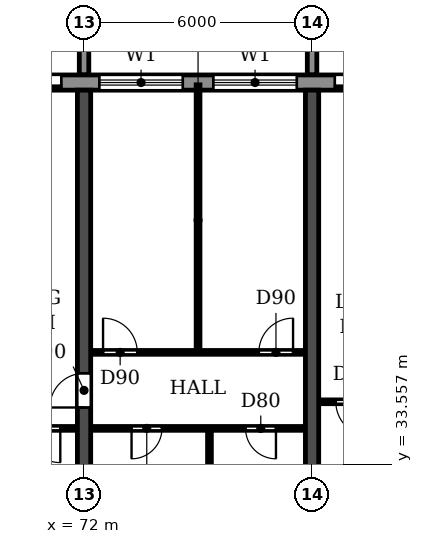
"""IFC4 building model, lengths in metres.
Left out: names, types, materials, properties, quantities, classifications, styles, units other than length and angle.
Written with IfcOpenShell. Run it as: python <this file> out.ifc"""

import sys

from ifc_helpers import new_model, si_unit, direction, frame, frame_2d, origin, place, context, subcontext, project, spatial, polyline, rectangle, outline, extrude, source, transform, mapped, element, fill, save


model = new_model("IFC4")
c1 = context("Model", 3, precision=1e-05, world=origin(), true_north=direction((0.0, 1.0)))
c2 = subcontext(c1, "Body", "Model", "MODEL_VIEW")
j1 = project(units=[si_unit("LENGTHUNIT", "METRE"), si_unit("PLANEANGLEUNIT", "RADIAN")], contexts=[c1])
p1 = place(None, origin())
s1 = spatial("IfcSite", under=j1, at=p1, CompositionType="ELEMENT")
p2 = place(p1, origin())
s2 = spatial("IfcBuilding", under=s1, at=p2, CompositionType="ELEMENT")
p3 = place(p2, frame((0.0, 0.0, 109.2)))
s3 = spatial("IfcBuildingStorey", under=s2, at=p3, CompositionType="ELEMENT", Elevation=109.2)
p4 = place(p3, frame((72.0, 30.525, 0.0), z_axis=(0.0, 0.0, 1.0), x_axis=(0.0, 1.0, 0.0)))
e1 = element("IfcWall", 1, at=p4, inside=s3, PredefinedType="SHEAR", context=c2, shape_type="SweptSolid", body=[
    extrude(rectangle(XDim=12.875, YDim=0.35, at=frame_2d((6.438, 0.0))), origin(), (0.0, 0.0, 1.0), 3.06),
])
p5 = place(p4, frame((4.525, 0.0, 0.0)))
e2 = element("IfcOpeningElement", 2, at=p5, cuts=e1, PredefinedType="OPENING", context=c2, shape_type="SweptSolid", body=[
    extrude(rectangle(XDim=0.9, YDim=2.1, at=frame_2d((0.45, 1.05))), frame((0.0, 0.185, 0.0), z_axis=(0.0, -1.0, 0.0), x_axis=(1.0, 0.0, 0.0)), (0.0, 0.0, 1.0), 0.37),
])
p6 = place(p3, frame((78.0, 30.525, 0.0), z_axis=(0.0, 0.0, 1.0), x_axis=(0.0, 1.0, 0.0)))
e3 = element("IfcWall", 3, at=p6, inside=s3, PredefinedType="SHEAR", context=c2, shape_type="SweptSolid", body=[
    extrude(rectangle(XDim=12.875, YDim=0.35, at=frame_2d((6.438, 0.0))), origin(), (0.0, 0.0, 1.0), 3.06),
])
p7 = place(p3, frame((85.317, 43.6, 0.0), z_axis=(0.0, 0.0, 1.0), x_axis=(-1.0, 0.0, 0.0)))
e4 = element("IfcWall", 4, at=p7, inside=s3, PredefinedType="STANDARD", context=c2, shape_type="SweptSolid", body=[
    extrude(rectangle(XDim=68.634, YDim=0.4, at=frame_2d((34.317, 0.0))), origin(), (0.0, 0.0, 1.0), 3.06),
])
p8 = place(p7, frame((64.917, 0.0, 0.0)))
e5 = element("IfcOpeningElement", 5, at=p8, cuts=e4, PredefinedType="OPENING", context=c2, shape_type="SweptSolid", body=[
    extrude(rectangle(XDim=1.8, YDim=2.4, at=frame_2d((0.9, 1.2))), frame((0.0, 0.21, 0.0), z_axis=(0.0, -1.0, 0.0), x_axis=(1.0, 0.0, 0.0)), (0.0, 0.0, 1.0), 0.42),
])
p9 = place(p7, frame((61.717, 0.0, 0.9)))
e6 = element("IfcOpeningElement", 6, at=p9, cuts=e4, PredefinedType="OPENING", context=c2, shape_type="SweptSolid", body=[
    extrude(rectangle(XDim=2.2, YDim=1.5, at=frame_2d((1.1, 0.75))), frame((0.0, 0.21, 0.0), z_axis=(0.0, -1.0, 0.0), x_axis=(1.0, 0.0, 0.0)), (0.0, 0.0, 1.0), 0.42),
])
p10 = place(p7, frame((58.717, 0.0, 0.9)))
e7 = element("IfcOpeningElement", 7, at=p10, cuts=e4, PredefinedType="OPENING", context=c2, shape_type="SweptSolid", body=[
    extrude(rectangle(XDim=2.2, YDim=1.5, at=frame_2d((1.1, 0.75))), frame((0.0, 0.21, 0.0), z_axis=(0.0, -1.0, 0.0), x_axis=(1.0, 0.0, 0.0)), (0.0, 0.0, 1.0), 0.42),
])
p11 = place(p7, frame((55.917, 0.0, 0.0)))
e8 = element("IfcOpeningElement", 8, at=p11, cuts=e4, PredefinedType="OPENING", context=c2, shape_type="SweptSolid", body=[
    extrude(rectangle(XDim=1.8, YDim=2.4, at=frame_2d((0.9, 1.2))), frame((0.0, 0.21, 0.0), z_axis=(0.0, -1.0, 0.0), x_axis=(1.0, 0.0, 0.0)), (0.0, 0.0, 1.0), 0.42),
])
p12 = place(p7, frame((52.917, 0.0, 0.0)))
e9 = element("IfcOpeningElement", 9, at=p12, cuts=e4, PredefinedType="OPENING", context=c2, shape_type="SweptSolid", body=[
    extrude(rectangle(XDim=1.8, YDim=2.4, at=frame_2d((0.9, 1.2))), frame((0.0, 0.21, 0.0), z_axis=(0.0, -1.0, 0.0), x_axis=(1.0, 0.0, 0.0)), (0.0, 0.0, 1.0), 0.42),
])
p13 = place(p7, frame((49.717, 0.0, 0.9)))
e10 = element("IfcOpeningElement", 10, at=p13, cuts=e4, PredefinedType="OPENING", context=c2, shape_type="SweptSolid", body=[
    extrude(rectangle(XDim=2.2, YDim=1.5, at=frame_2d((1.1, 0.75))), frame((0.0, 0.21, 0.0), z_axis=(0.0, -1.0, 0.0), x_axis=(1.0, 0.0, 0.0)), (0.0, 0.0, 1.0), 0.42),
])
p14 = place(p7, frame((46.717, 0.0, 0.9)))
e11 = element("IfcOpeningElement", 11, at=p14, cuts=e4, PredefinedType="OPENING", context=c2, shape_type="SweptSolid", body=[
    extrude(rectangle(XDim=2.2, YDim=1.5, at=frame_2d((1.1, 0.75))), frame((0.0, 0.21, 0.0), z_axis=(0.0, -1.0, 0.0), x_axis=(1.0, 0.0, 0.0)), (0.0, 0.0, 1.0), 0.42),
])
p15 = place(p7, frame((43.917, 0.0, 0.0)))
e12 = element("IfcOpeningElement", 12, at=p15, cuts=e4, PredefinedType="OPENING", context=c2, shape_type="SweptSolid", body=[
    extrude(rectangle(XDim=1.8, YDim=2.4, at=frame_2d((0.9, 1.2))), frame((0.0, 0.21, 0.0), z_axis=(0.0, -1.0, 0.0), x_axis=(1.0, 0.0, 0.0)), (0.0, 0.0, 1.0), 0.42),
])
p16 = place(p7, frame((40.717, 0.0, 0.9)))
e13 = element("IfcOpeningElement", 13, at=p16, cuts=e4, PredefinedType="OPENING", context=c2, shape_type="SweptSolid", body=[
    extrude(rectangle(XDim=2.2, YDim=1.5, at=frame_2d((1.1, 0.75))), frame((0.0, 0.21, 0.0), z_axis=(0.0, -1.0, 0.0), x_axis=(1.0, 0.0, 0.0)), (0.0, 0.0, 1.0), 0.42),
])
p17 = place(p7, frame((37.717, 0.0, 0.9)))
e14 = element("IfcOpeningElement", 14, at=p17, cuts=e4, PredefinedType="OPENING", context=c2, shape_type="SweptSolid", body=[
    extrude(rectangle(XDim=2.2, YDim=1.5, at=frame_2d((1.1, 0.75))), frame((0.0, 0.21, 0.0), z_axis=(0.0, -1.0, 0.0), x_axis=(1.0, 0.0, 0.0)), (0.0, 0.0, 1.0), 0.42),
])
p18 = place(p7, frame((34.917, 0.0, 0.0)))
e15 = element("IfcOpeningElement", 15, at=p18, cuts=e4, PredefinedType="OPENING", context=c2, shape_type="SweptSolid", body=[
    extrude(rectangle(XDim=1.8, YDim=2.4, at=frame_2d((0.9, 1.2))), frame((0.0, 0.21, 0.0), z_axis=(0.0, -1.0, 0.0), x_axis=(1.0, 0.0, 0.0)), (0.0, 0.0, 1.0), 0.42),
])
p19 = place(p7, frame((31.717, 0.0, 0.9)))
e16 = element("IfcOpeningElement", 16, at=p19, cuts=e4, PredefinedType="OPENING", context=c2, shape_type="SweptSolid", body=[
    extrude(rectangle(XDim=2.2, YDim=1.5, at=frame_2d((1.1, 0.75))), frame((0.0, 0.21, 0.0), z_axis=(0.0, -1.0, 0.0), x_axis=(1.0, 0.0, 0.0)), (0.0, 0.0, 1.0), 0.42),
])
p20 = place(p7, frame((28.917, 0.0, 0.0)))
e17 = element("IfcOpeningElement", 17, at=p20, cuts=e4, PredefinedType="OPENING", context=c2, shape_type="SweptSolid", body=[
    extrude(rectangle(XDim=1.8, YDim=2.4, at=frame_2d((0.9, 1.2))), frame((0.0, 0.21, 0.0), z_axis=(0.0, -1.0, 0.0), x_axis=(1.0, 0.0, 0.0)), (0.0, 0.0, 1.0), 0.42),
])
p21 = place(p7, frame((25.717, 0.0, 0.9)))
e18 = element("IfcOpeningElement", 18, at=p21, cuts=e4, PredefinedType="OPENING", context=c2, shape_type="SweptSolid", body=[
    extrude(rectangle(XDim=2.2, YDim=1.5, at=frame_2d((1.1, 0.75))), frame((0.0, 0.21, 0.0), z_axis=(0.0, -1.0, 0.0), x_axis=(1.0, 0.0, 0.0)), (0.0, 0.0, 1.0), 0.42),
])
p22 = place(p7, frame((22.717, 0.0, 0.9)))
e19 = element("IfcOpeningElement", 19, at=p22, cuts=e4, PredefinedType="OPENING", context=c2, shape_type="SweptSolid", body=[
    extrude(rectangle(XDim=2.2, YDim=1.5, at=frame_2d((1.1, 0.75))), frame((0.0, 0.21, 0.0), z_axis=(0.0, -1.0, 0.0), x_axis=(1.0, 0.0, 0.0)), (0.0, 0.0, 1.0), 0.42),
])
p23 = place(p7, frame((19.917, 0.0, 0.0)))
e20 = element("IfcOpeningElement", 20, at=p23, cuts=e4, PredefinedType="OPENING", context=c2, shape_type="SweptSolid", body=[
    extrude(rectangle(XDim=1.8, YDim=2.4, at=frame_2d((0.9, 1.2))), frame((0.0, 0.21, 0.0), z_axis=(0.0, -1.0, 0.0), x_axis=(1.0, 0.0, 0.0)), (0.0, 0.0, 1.0), 0.42),
])
p24 = place(p7, frame((16.717, 0.0, 0.9)))
e21 = element("IfcOpeningElement", 21, at=p24, cuts=e4, PredefinedType="OPENING", context=c2, shape_type="SweptSolid", body=[
    extrude(rectangle(XDim=2.2, YDim=1.5, at=frame_2d((1.1, 0.75))), frame((0.0, 0.21, 0.0), z_axis=(0.0, -1.0, 0.0), x_axis=(1.0, 0.0, 0.0)), (0.0, 0.0, 1.0), 0.42),
])
p25 = place(p7, frame((13.917, 0.0, 0.0)))
e22 = element("IfcOpeningElement", 22, at=p25, cuts=e4, PredefinedType="OPENING", context=c2, shape_type="SweptSolid", body=[
    extrude(rectangle(XDim=1.8, YDim=2.4, at=frame_2d((0.9, 1.2))), frame((0.0, 0.21, 0.0), z_axis=(0.0, -1.0, 0.0), x_axis=(1.0, 0.0, 0.0)), (0.0, 0.0, 1.0), 0.42),
])
p26 = place(p7, frame((10.717, 0.0, 0.9)))
e23 = element("IfcOpeningElement", 23, at=p26, cuts=e4, PredefinedType="OPENING", context=c2, shape_type="SweptSolid", body=[
    extrude(rectangle(XDim=2.2, YDim=1.5, at=frame_2d((1.1, 0.75))), frame((0.0, 0.21, 0.0), z_axis=(0.0, -1.0, 0.0), x_axis=(1.0, 0.0, 0.0)), (0.0, 0.0, 1.0), 0.42),
])
p27 = place(p7, frame((7.717, 0.0, 0.9)))
e24 = element("IfcOpeningElement", 24, at=p27, cuts=e4, PredefinedType="OPENING", context=c2, shape_type="SweptSolid", body=[
    extrude(rectangle(XDim=2.2, YDim=1.5, at=frame_2d((1.1, 0.75))), frame((0.0, 0.21, 0.0), z_axis=(0.0, -1.0, 0.0), x_axis=(1.0, 0.0, 0.0)), (0.0, 0.0, 1.0), 0.42),
])
p28 = place(p7, frame((4.917, 0.0, 0.0)))
e25 = element("IfcOpeningElement", 25, at=p28, cuts=e4, PredefinedType="OPENING", context=c2, shape_type="SweptSolid", body=[
    extrude(rectangle(XDim=1.8, YDim=2.4, at=frame_2d((0.9, 1.2))), frame((0.0, 0.21, 0.0), z_axis=(0.0, -1.0, 0.0), x_axis=(1.0, 0.0, 0.0)), (0.0, 0.0, 1.0), 0.42),
])
p29 = place(p7, frame((1.717, 0.0, 0.9)))
e26 = element("IfcOpeningElement", 26, at=p29, cuts=e4, PredefinedType="OPENING", context=c2, shape_type="SweptSolid", body=[
    extrude(rectangle(XDim=2.2, YDim=1.5, at=frame_2d((1.1, 0.75))), frame((0.0, 0.21, 0.0), z_axis=(0.0, -1.0, 0.0), x_axis=(1.0, 0.0, 0.0)), (0.0, 0.0, 1.0), 0.42),
])
m1 = source(origin(), c2, "Body", "SweptSolid", [
    extrude(outline(polyline([(0.0, 0.0), (0.25, 0.0), (0.25, 3.1), (0.0, 3.1), (0.0, 0.0)])), origin(), (0.0, 0.0, 1.0), 3.1),
])
for number, where in (
    (27, (71.875, 43.8, 0.0)),
    (28, (77.875, 43.8, 0.0)),
):
    element("IfcWall", number, at=place(p3, frame(where)), inside=s3, PredefinedType="STANDARD", context=c2, shape_type="MappedRepresentation", body=[
        mapped(m1, transform((0.0, 0.0, 0.0))),
    ])
p30 = place(p3, frame((69.8, 34.5, 0.0), z_axis=(0.0, 0.0, 1.0), x_axis=(1.0, 0.0, 0.0)))
e29 = element("IfcWall", 29, at=p30, inside=s3, PredefinedType="PARTITIONING", context=c2, shape_type="SweptSolid", body=[
    extrude(rectangle(XDim=2.015, YDim=0.1, at=frame_2d((1.007, 0.0))), origin(), (0.0, 0.0, 1.0), 3.06),
])
p31 = place(p30, frame((0.675, 0.0, 0.0)))
e30 = element("IfcOpeningElement", 30, at=p31, cuts=e29, PredefinedType="OPENING", context=c2, shape_type="SweptSolid", body=[
    extrude(rectangle(XDim=0.9, YDim=2.1, at=frame_2d((0.45, 1.05))), frame((0.0, 0.06, 0.0), z_axis=(0.0, -1.0, 0.0), x_axis=(1.0, 0.0, 0.0)), (0.0, 0.0, 1.0), 0.12),
])
p32 = place(p3, frame((72.185, 34.5, 0.0), z_axis=(0.0, 0.0, 1.0), x_axis=(1.0, 0.0, 0.0)))
e31 = element("IfcWall", 31, at=p32, inside=s3, PredefinedType="PARTITIONING", context=c2, shape_type="SweptSolid", body=[
    extrude(rectangle(XDim=5.63, YDim=0.1, at=frame_2d((2.815, 0.0))), origin(), (0.0, 0.0, 1.0), 3.06),
])
p33 = place(p32, frame((1.065, 0.0, 0.0)))
e32 = element("IfcOpeningElement", 32, at=p33, cuts=e31, PredefinedType="OPENING", context=c2, shape_type="SweptSolid", body=[
    extrude(rectangle(XDim=0.8, YDim=2.1, at=frame_2d((0.4, 1.05))), frame((0.0, 0.06, 0.0), z_axis=(0.0, -1.0, 0.0), x_axis=(1.0, 0.0, 0.0)), (0.0, 0.0, 1.0), 0.12),
])
p34 = place(p32, frame((4.065, 0.0, 0.0)))
e33 = element("IfcOpeningElement", 33, at=p34, cuts=e31, PredefinedType="OPENING", context=c2, shape_type="SweptSolid", body=[
    extrude(rectangle(XDim=0.8, YDim=2.1, at=frame_2d((0.4, 1.05))), frame((0.0, 0.06, 0.0), z_axis=(0.0, -1.0, 0.0), x_axis=(1.0, 0.0, 0.0)), (0.0, 0.0, 1.0), 0.12),
])
p35 = place(p3, frame((78.185, 35.2, 0.0), z_axis=(0.0, 0.0, 1.0), x_axis=(1.0, 0.0, 0.0)))
e34 = element("IfcWall", 34, at=p35, inside=s3, PredefinedType="PARTITIONING", context=c2, shape_type="SweptSolid", body=[
    extrude(rectangle(XDim=2.015, YDim=0.1, at=frame_2d((1.007, 0.0))), origin(), (0.0, 0.0, 1.0), 3.06),
])
p36 = place(p35, frame((0.44, 0.0, 0.0)))
e35 = element("IfcOpeningElement", 35, at=p36, cuts=e34, PredefinedType="OPENING", context=c2, shape_type="SweptSolid", body=[
    extrude(rectangle(XDim=0.9, YDim=2.1, at=frame_2d((0.45, 1.05))), frame((0.0, 0.06, 0.0), z_axis=(0.0, -1.0, 0.0), x_axis=(1.0, 0.0, 0.0)), (0.0, 0.0, 1.0), 0.12),
])
p37 = place(p3, frame((72.185, 36.5, 0.0), z_axis=(0.0, 0.0, 1.0), x_axis=(1.0, 0.0, 0.0)))
e36 = element("IfcWall", 36, at=p37, inside=s3, PredefinedType="PARTITIONING", context=c2, shape_type="SweptSolid", body=[
    extrude(rectangle(XDim=5.63, YDim=0.1, at=frame_2d((2.815, 0.0))), origin(), (0.0, 0.0, 1.0), 3.06),
])
p38 = place(p37, frame((0.315, 0.0, 0.0)))
e37 = element("IfcOpeningElement", 37, at=p38, cuts=e36, PredefinedType="OPENING", context=c2, shape_type="SweptSolid", body=[
    extrude(rectangle(XDim=0.9, YDim=2.1, at=frame_2d((0.45, 1.05))), frame((0.0, 0.06, 0.0), z_axis=(0.0, -1.0, 0.0), x_axis=(1.0, 0.0, 0.0)), (0.0, 0.0, 1.0), 0.12),
])
p39 = place(p37, frame((4.415, 0.0, 0.0)))
e38 = element("IfcOpeningElement", 38, at=p39, cuts=e36, PredefinedType="OPENING", context=c2, shape_type="SweptSolid", body=[
    extrude(rectangle(XDim=0.9, YDim=2.1, at=frame_2d((0.45, 1.05))), frame((0.0, 0.06, 0.0), z_axis=(0.0, -1.0, 0.0), x_axis=(1.0, 0.0, 0.0)), (0.0, 0.0, 1.0), 0.12),
])
p40 = place(p3, frame((75.0, 36.55, 0.0), z_axis=(0.0, 0.0, 1.0), x_axis=(0.0, 1.0, 0.0)))
e39 = element("IfcWall", 39, at=p40, inside=s3, PredefinedType="PARTITIONING", context=c2, shape_type="SweptSolid", body=[
    extrude(rectangle(XDim=6.99, YDim=0.1, at=frame_2d((3.495, 0.0))), origin(), (0.0, 0.0, 1.0), 3.06),
])
p41 = place(p3, frame((75.3, 30.535, 0.0), z_axis=(0.0, 0.0, 1.0), x_axis=(0.0, 1.0, 0.0)))
e40 = element("IfcWall", 40, at=p41, inside=s3, PredefinedType="PARTITIONING", context=c2, shape_type="SweptSolid", body=[
    extrude(rectangle(XDim=3.915, YDim=0.1, at=frame_2d((1.958, 0.0))), origin(), (0.0, 0.0, 1.0), 3.06),
])
p42 = place(p25, origin())
e41 = element("IfcDoor", 41, at=p42, inside=s3, OperationType="DOUBLE_DOOR_SLIDING", PredefinedType="DOOR", context=c2, shape_type="SweptSolid", body=[
    extrude(rectangle(XDim=1.8, YDim=2.4, at=frame_2d((0.9, 1.2))), frame((0.0, 0.025, 0.0), z_axis=(0.0, -1.0, 0.0), x_axis=(1.0, 0.0, 0.0)), (0.0, 0.0, 1.0), 0.05),
])
fill(e22, e41)
p43 = place(p26, origin())
e42 = element("IfcWindow", 42, at=p43, inside=s3, PartitioningType="DOUBLE_PANEL_HORIZONTAL", PredefinedType="WINDOW", context=c2, shape_type="SweptSolid", body=[
    extrude(rectangle(XDim=2.2, YDim=1.5, at=frame_2d((1.1, 0.75))), frame((0.0, 0.03, 0.0), z_axis=(0.0, -1.0, 0.0), x_axis=(1.0, 0.0, 0.0)), (0.0, 0.0, 1.0), 0.06),
])
fill(e23, e42)
p44 = place(p27, origin())
e43 = element("IfcWindow", 43, at=p44, inside=s3, PartitioningType="DOUBLE_PANEL_HORIZONTAL", PredefinedType="WINDOW", context=c2, shape_type="SweptSolid", body=[
    extrude(rectangle(XDim=2.2, YDim=1.5, at=frame_2d((1.1, 0.75))), frame((0.0, 0.03, 0.0), z_axis=(0.0, -1.0, 0.0), x_axis=(1.0, 0.0, 0.0)), (0.0, 0.0, 1.0), 0.06),
])
fill(e24, e43)
p45 = place(p28, origin())
e44 = element("IfcDoor", 44, at=p45, inside=s3, OperationType="DOUBLE_DOOR_SLIDING", PredefinedType="DOOR", context=c2, shape_type="SweptSolid", body=[
    extrude(rectangle(XDim=1.8, YDim=2.4, at=frame_2d((0.9, 1.2))), frame((0.0, 0.025, 0.0), z_axis=(0.0, -1.0, 0.0), x_axis=(1.0, 0.0, 0.0)), (0.0, 0.0, 1.0), 0.05),
])
fill(e25, e44)
p46 = place(p38, origin())
e45 = element("IfcDoor", 45, at=p46, inside=s3, OperationType="SINGLE_SWING_LEFT", PredefinedType="DOOR", context=c2, shape_type="SweptSolid", body=[
    extrude(rectangle(XDim=0.9, YDim=2.1, at=frame_2d((0.45, 1.05))), frame((0.0, 0.025, 0.0), z_axis=(0.0, -1.0, 0.0), x_axis=(1.0, 0.0, 0.0)), (0.0, 0.0, 1.0), 0.05),
])
fill(e37, e45)
p47 = place(p33, frame((0.8, 0.0, 0.0), z_axis=(0.0, 0.0, 1.0), x_axis=(-1.0, 0.0, 0.0)))
e46 = element("IfcDoor", 46, at=p47, inside=s3, OperationType="SINGLE_SWING_RIGHT", PredefinedType="DOOR", context=c2, shape_type="SweptSolid", body=[
    extrude(rectangle(XDim=0.8, YDim=2.1, at=frame_2d((0.4, 1.05))), frame((0.0, 0.025, 0.0), z_axis=(0.0, -1.0, 0.0), x_axis=(1.0, 0.0, 0.0)), (0.0, 0.0, 1.0), 0.05),
])
fill(e32, e46)
p48 = place(p34, frame((0.8, 0.0, 0.0), z_axis=(0.0, 0.0, 1.0), x_axis=(-1.0, 0.0, 0.0)))
e47 = element("IfcDoor", 47, at=p48, inside=s3, OperationType="SINGLE_SWING_LEFT", PredefinedType="DOOR", context=c2, shape_type="SweptSolid", body=[
    extrude(rectangle(XDim=0.8, YDim=2.1, at=frame_2d((0.4, 1.05))), frame((0.0, 0.025, 0.0), z_axis=(0.0, -1.0, 0.0), x_axis=(1.0, 0.0, 0.0)), (0.0, 0.0, 1.0), 0.05),
])
fill(e33, e47)
p49 = place(p39, origin())
e48 = element("IfcDoor", 48, at=p49, inside=s3, OperationType="SINGLE_SWING_RIGHT", PredefinedType="DOOR", context=c2, shape_type="SweptSolid", body=[
    extrude(rectangle(XDim=0.9, YDim=2.1, at=frame_2d((0.45, 1.05))), frame((0.0, 0.025, 0.0), z_axis=(0.0, -1.0, 0.0), x_axis=(1.0, 0.0, 0.0)), (0.0, 0.0, 1.0), 0.05),
])
fill(e38, e48)
p50 = place(p31, frame((0.9, 0.0, 0.0), z_axis=(0.0, 0.0, 1.0), x_axis=(-1.0, 0.0, 0.0)))
e49 = element("IfcDoor", 49, at=p50, inside=s3, OperationType="SINGLE_SWING_LEFT", PredefinedType="DOOR", context=c2, shape_type="SweptSolid", body=[
    extrude(rectangle(XDim=0.9, YDim=2.1, at=frame_2d((0.45, 1.05))), frame((0.0, 0.025, 0.0), z_axis=(0.0, -1.0, 0.0), x_axis=(1.0, 0.0, 0.0)), (0.0, 0.0, 1.0), 0.05),
])
fill(e30, e49)
p51 = place(p5, origin())
e50 = element("IfcDoor", 50, at=p51, inside=s3, OperationType="SINGLE_SWING_LEFT", PredefinedType="DOOR", context=c2, shape_type="SweptSolid", body=[
    extrude(rectangle(XDim=0.9, YDim=2.1, at=frame_2d((0.45, 1.05))), frame((0.0, 0.025, 0.0), z_axis=(0.0, -1.0, 0.0), x_axis=(1.0, 0.0, 0.0)), (0.0, 0.0, 1.0), 0.05),
])
fill(e2, e50)
p52 = place(p36, frame((0.9, 0.0, 0.0), z_axis=(0.0, 0.0, 1.0), x_axis=(-1.0, 0.0, 0.0)))
e51 = element("IfcDoor", 51, at=p52, inside=s3, OperationType="SINGLE_SWING_LEFT", PredefinedType="DOOR", context=c2, shape_type="SweptSolid", body=[
    extrude(rectangle(XDim=0.9, YDim=2.1, at=frame_2d((0.45, 1.05))), frame((0.0, 0.025, 0.0), z_axis=(0.0, -1.0, 0.0), x_axis=(1.0, 0.0, 0.0)), (0.0, 0.0, 1.0), 0.05),
])
fill(e35, e51)
save(model, sys.argv[1])
